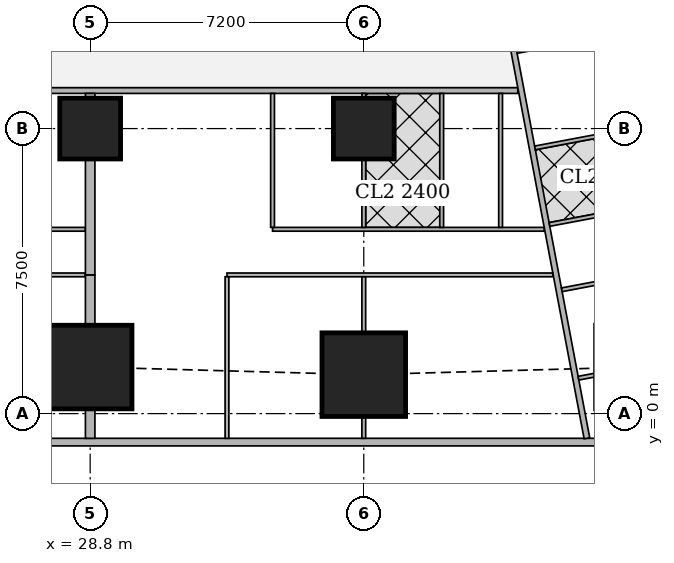
"""IFC4 building model, lengths in metres.
Left out: names, types, materials, properties, quantities, classifications, styles, units other than length and angle.
Written with IfcOpenShell. Run it as: python <this file> out.ifc"""

import sys

from ifc_helpers import new_model, si_unit, direction, frame, frame_2d, origin, origin_2d, place, context, subcontext, project, spatial, rectangle, extrude, element, fill, save


model = new_model("IFC4")
c1 = context("Model", 3, precision=1e-05, world=origin(), true_north=direction((0.0, 1.0)))
c2 = subcontext(c1, "Body", "Model", "MODEL_VIEW")
j1 = project(units=[si_unit("LENGTHUNIT", "METRE"), si_unit("PLANEANGLEUNIT", "RADIAN")], contexts=[c1])
p1 = place(None, origin())
s1 = spatial("IfcSite", under=j1, at=p1, CompositionType="ELEMENT")
p2 = place(p1, origin())
s2 = spatial("IfcBuilding", under=s1, at=p2, CompositionType="ELEMENT")
p3 = place(p2, frame((0.0, 0.0, 111.65)))
s3 = spatial("IfcBuildingStorey", under=s2, at=p3, CompositionType="ELEMENT", Elevation=111.65)
for number, where, z_axis, x_axis in (
    (1, (28.8, 1.225, 0.0), (0.0, 0.0, 1.0), (1.0, 0.0, 0.0)),
    (2, (36.0, 1.025, 0.0), (0.0, 0.0, 1.0), (1.0, 0.0, 0.0)),
):
    element("IfcColumn", number, at=place(p3, frame(where, z_axis=z_axis, x_axis=x_axis)), inside=s3, PredefinedType="COLUMN", context=c2, shape_type="SweptSolid", body=[
        extrude(rectangle(XDim=2.2, YDim=2.2, at=origin_2d()), origin(), (0.0, 0.0, 1.0), 3.75),
    ])
for number, where, z_axis, x_axis in (
    (3, (28.8, 7.5, 0.0), (0.0, 0.0, 1.0), (1.0, 0.0, 0.0)),
    (4, (36.0, 7.5, 0.0), (0.0, 0.0, 1.0), (1.0, 0.0, 0.0)),
):
    element("IfcColumn", number, at=place(p3, frame(where, z_axis=z_axis, x_axis=x_axis)), inside=s3, PredefinedType="COLUMN", context=c2, shape_type="SweptSolid", body=[
        extrude(rectangle(XDim=1.6, YDim=1.6, at=origin_2d()), origin(), (0.0, 0.0, 1.0), 3.75),
    ])
p4 = place(p3, frame((2.163, -0.75, 0.0), z_axis=(0.0, 0.0, 1.0), x_axis=(1.0, 0.0, 0.0)))
e5 = element("IfcWall", 5, at=p4, inside=s3, PredefinedType="SOLIDWALL", context=c2, shape_type="SweptSolid", body=[
    extrude(rectangle(XDim=45.628, YDim=0.2, at=frame_2d((22.814, 0.0))), origin(), (0.0, 0.0, 1.0), 3.5),
])
p5 = place(p4, frame((9.537, 0.0, 0.9)))
e6 = element("IfcOpeningElement", 6, at=p5, cuts=e5, PredefinedType="OPENING", context=c2, shape_type="SweptSolid", body=[
    extrude(rectangle(XDim=1.8, YDim=1.5, at=frame_2d((0.9, 0.75))), frame((0.0, 0.11, 0.0), z_axis=(0.0, -1.0, 0.0), x_axis=(1.0, 0.0, 0.0)), (0.0, 0.0, 1.0), 0.22),
])
p6 = place(p4, frame((13.137, 0.0, 0.9)))
e7 = element("IfcOpeningElement", 7, at=p6, cuts=e5, PredefinedType="OPENING", context=c2, shape_type="SweptSolid", body=[
    extrude(rectangle(XDim=1.8, YDim=1.5, at=frame_2d((0.9, 0.75))), frame((0.0, 0.11, 0.0), z_axis=(0.0, -1.0, 0.0), x_axis=(1.0, 0.0, 0.0)), (0.0, 0.0, 1.0), 0.22),
])
p7 = place(p4, frame((16.737, 0.0, 0.9)))
e8 = element("IfcOpeningElement", 8, at=p7, cuts=e5, PredefinedType="OPENING", context=c2, shape_type="SweptSolid", body=[
    extrude(rectangle(XDim=1.8, YDim=1.5, at=frame_2d((0.9, 0.75))), frame((0.0, 0.11, 0.0), z_axis=(0.0, -1.0, 0.0), x_axis=(1.0, 0.0, 0.0)), (0.0, 0.0, 1.0), 0.22),
])
p8 = place(p4, frame((20.337, 0.0, 0.9)))
e9 = element("IfcOpeningElement", 9, at=p8, cuts=e5, PredefinedType="OPENING", context=c2, shape_type="SweptSolid", body=[
    extrude(rectangle(XDim=1.8, YDim=1.5, at=frame_2d((0.9, 0.75))), frame((0.0, 0.11, 0.0), z_axis=(0.0, -1.0, 0.0), x_axis=(1.0, 0.0, 0.0)), (0.0, 0.0, 1.0), 0.22),
])
p9 = place(p4, frame((23.937, 0.0, 0.9)))
e10 = element("IfcOpeningElement", 10, at=p9, cuts=e5, PredefinedType="OPENING", context=c2, shape_type="SweptSolid", body=[
    extrude(rectangle(XDim=1.8, YDim=1.5, at=frame_2d((0.9, 0.75))), frame((0.0, 0.11, 0.0), z_axis=(0.0, -1.0, 0.0), x_axis=(1.0, 0.0, 0.0)), (0.0, 0.0, 1.0), 0.22),
])
p10 = place(p4, frame((27.537, 0.0, 0.9)))
e11 = element("IfcOpeningElement", 11, at=p10, cuts=e5, PredefinedType="OPENING", context=c2, shape_type="SweptSolid", body=[
    extrude(rectangle(XDim=1.8, YDim=1.5, at=frame_2d((0.9, 0.75))), frame((0.0, 0.11, 0.0), z_axis=(0.0, -1.0, 0.0), x_axis=(1.0, 0.0, 0.0)), (0.0, 0.0, 1.0), 0.22),
])
p11 = place(p4, frame((31.137, 0.0, 0.9)))
e12 = element("IfcOpeningElement", 12, at=p11, cuts=e5, PredefinedType="OPENING", context=c2, shape_type="SweptSolid", body=[
    extrude(rectangle(XDim=1.8, YDim=1.5, at=frame_2d((0.9, 0.75))), frame((0.0, 0.11, 0.0), z_axis=(0.0, -1.0, 0.0), x_axis=(1.0, 0.0, 0.0)), (0.0, 0.0, 1.0), 0.22),
])
p12 = place(p4, frame((34.737, 0.0, 0.9)))
e13 = element("IfcOpeningElement", 13, at=p12, cuts=e5, PredefinedType="OPENING", context=c2, shape_type="SweptSolid", body=[
    extrude(rectangle(XDim=1.8, YDim=1.5, at=frame_2d((0.9, 0.75))), frame((0.0, 0.11, 0.0), z_axis=(0.0, -1.0, 0.0), x_axis=(1.0, 0.0, 0.0)), (0.0, 0.0, 1.0), 0.22),
])
p13 = place(p3, frame((40.053, 8.5, 0.0), z_axis=(0.0, 0.0, 1.0), x_axis=(-1.0, 0.0, 0.0)))
e14 = element("IfcWall", 14, at=p13, inside=s3, PredefinedType="SOLIDWALL", context=c2, shape_type="SweptSolid", body=[
    extrude(rectangle(XDim=31.703, YDim=0.15, at=frame_2d((15.852, 0.0))), origin(), (0.0, 0.0, 1.0), 3.5),
])
p14 = place(p13, frame((28.103, 0.0, 0.0)))
e15 = element("IfcOpeningElement", 15, at=p14, cuts=e14, PredefinedType="OPENING", context=c2, shape_type="SweptSolid", body=[
    extrude(rectangle(XDim=1.0, YDim=2.1, at=frame_2d((0.5, 1.05))), frame((0.0, 0.085, 0.0), z_axis=(0.0, -1.0, 0.0), x_axis=(1.0, 0.0, 0.0)), (0.0, 0.0, 1.0), 0.17),
])
p15 = place(p13, frame((19.754, 0.0, 0.0)))
e16 = element("IfcOpeningElement", 16, at=p15, cuts=e14, PredefinedType="OPENING", context=c2, shape_type="SweptSolid", body=[
    extrude(rectangle(XDim=1.0, YDim=2.1, at=frame_2d((0.5, 1.05))), frame((0.0, 0.085, 0.0), z_axis=(0.0, -1.0, 0.0), x_axis=(1.0, 0.0, 0.0)), (0.0, 0.0, 1.0), 0.17),
])
p16 = place(p13, frame((8.353, 0.0, 0.0)))
e17 = element("IfcOpeningElement", 17, at=p16, cuts=e14, PredefinedType="OPENING", context=c2, shape_type="SweptSolid", body=[
    extrude(rectangle(XDim=1.0, YDim=2.1, at=frame_2d((0.5, 1.05))), frame((0.0, 0.085, 0.0), z_axis=(0.0, -1.0, 0.0), x_axis=(1.0, 0.0, 0.0)), (0.0, 0.0, 1.0), 0.17),
])
p17 = place(p3, frame((33.127, 45.65, 0.0), z_axis=(0.0, 0.0, 1.0), x_axis=(0.185598547723, -0.98262565562, 0.0)))
e18 = element("IfcWall", 18, at=p17, inside=s3, PredefinedType="SOLIDWALL", context=c2, shape_type="SweptSolid", body=[
    extrude(rectangle(XDim=47.118, YDim=0.15, at=frame_2d((23.559, 0.0))), origin(), (0.0, 0.0, 1.0), 2.2),
])
p18 = place(p17, frame((20.373, 0.0, 0.0)))
e19 = element("IfcOpeningElement", 19, at=p18, cuts=e18, PredefinedType="OPENING", context=c2, shape_type="SweptSolid", body=[
    extrude(rectangle(XDim=1.0, YDim=2.1, at=frame_2d((0.5, 1.05))), frame((0.0, 0.085, 0.0), z_axis=(0.0, -1.0, 0.0), x_axis=(1.0, 0.0, 0.0)), (0.0, 0.0, 1.0), 0.17),
])
p19 = place(p17, frame((24.188, 0.0, 0.0)))
e20 = element("IfcOpeningElement", 20, at=p19, cuts=e18, PredefinedType="OPENING", context=c2, shape_type="SweptSolid", body=[
    extrude(rectangle(XDim=1.0, YDim=2.1, at=frame_2d((0.5, 1.05))), frame((0.0, 0.085, 0.0), z_axis=(0.0, -1.0, 0.0), x_axis=(1.0, 0.0, 0.0)), (0.0, 0.0, 1.0), 0.17),
])
p20 = place(p17, frame((32.608, 0.0, 0.0)))
e21 = element("IfcOpeningElement", 21, at=p20, cuts=e18, PredefinedType="OPENING", context=c2, shape_type="SweptSolid", body=[
    extrude(rectangle(XDim=1.0, YDim=2.1, at=frame_2d((0.5, 1.05))), frame((0.0, 0.085, 0.0), z_axis=(0.0, -1.0, 0.0), x_axis=(1.0, 0.0, 0.0)), (0.0, 0.0, 1.0), 0.17),
])
p21 = place(p3, frame((28.675, 3.65, 0.0), z_axis=(0.0, 0.0, 1.0), x_axis=(-1.0, 0.0, 0.0)))
e22 = element("IfcWall", 22, at=p21, inside=s3, PredefinedType="PARTITIONING", context=c2, shape_type="SweptSolid", body=[
    extrude(rectangle(XDim=7.075, YDim=0.1, at=frame_2d((3.538, 0.0))), origin(), (0.0, 0.0, 1.0), 3.5),
])
p22 = place(p21, frame((5.975, 0.0, 0.0)))
e23 = element("IfcOpeningElement", 23, at=p22, cuts=e22, PredefinedType="OPENING", context=c2, shape_type="SweptSolid", body=[
    extrude(rectangle(XDim=0.9, YDim=2.1, at=frame_2d((0.45, 1.05))), frame((0.0, 0.06, 0.0), z_axis=(0.0, -1.0, 0.0), x_axis=(1.0, 0.0, 0.0)), (0.0, 0.0, 1.0), 0.12),
])
p23 = place(p21, frame((2.375, 0.0, 0.0)))
e24 = element("IfcOpeningElement", 24, at=p23, cuts=e22, PredefinedType="OPENING", context=c2, shape_type="SweptSolid", body=[
    extrude(rectangle(XDim=0.9, YDim=2.1, at=frame_2d((0.45, 1.05))), frame((0.0, 0.06, 0.0), z_axis=(0.0, -1.0, 0.0), x_axis=(1.0, 0.0, 0.0)), (0.0, 0.0, 1.0), 0.12),
])
p24 = place(p3, frame((28.675, 4.85, 0.0), z_axis=(0.0, 0.0, 1.0), x_axis=(-1.0, 0.0, 0.0)))
e25 = element("IfcWall", 25, at=p24, inside=s3, PredefinedType="PARTITIONING", context=c2, shape_type="SweptSolid", body=[
    extrude(rectangle(XDim=7.075, YDim=0.1, at=frame_2d((3.538, 0.0))), origin(), (0.0, 0.0, 1.0), 3.5),
])
p25 = place(p24, frame((5.6, 0.0, 0.0)))
e26 = element("IfcOpeningElement", 26, at=p25, cuts=e25, PredefinedType="OPENING", context=c2, shape_type="SweptSolid", body=[
    extrude(rectangle(XDim=0.9, YDim=2.1, at=frame_2d((0.45, 1.05))), frame((0.0, 0.06, 0.0), z_axis=(0.0, -1.0, 0.0), x_axis=(1.0, 0.0, 0.0)), (0.0, 0.0, 1.0), 0.12),
])
p26 = place(p24, frame((0.626, 0.0, 0.0)))
e27 = element("IfcOpeningElement", 27, at=p26, cuts=e25, PredefinedType="OPENING", context=c2, shape_type="SweptSolid", body=[
    extrude(rectangle(XDim=0.9, YDim=2.1, at=frame_2d((0.45, 1.05))), frame((0.0, 0.06, 0.0), z_axis=(0.0, -1.0, 0.0), x_axis=(1.0, 0.0, 0.0)), (0.0, 0.0, 1.0), 0.12),
])
p27 = place(p24, frame((3.201, 0.0, 0.0)))
e28 = element("IfcOpeningElement", 28, at=p27, cuts=e25, PredefinedType="OPENING", context=c2, shape_type="SweptSolid", body=[
    extrude(rectangle(XDim=0.9, YDim=2.1, at=frame_2d((0.45, 1.05))), frame((0.0, 0.06, 0.0), z_axis=(0.0, -1.0, 0.0), x_axis=(1.0, 0.0, 0.0)), (0.0, 0.0, 1.0), 0.12),
])
p28 = place(p3, frame((40.974, 3.65, 0.0), z_axis=(0.0, 0.0, 1.0), x_axis=(-1.0, 0.0, 0.0)))
e29 = element("IfcWall", 29, at=p28, inside=s3, PredefinedType="PARTITIONING", context=c2, shape_type="SweptSolid", body=[
    extrude(rectangle(XDim=8.574, YDim=0.1, at=frame_2d((4.287, 0.0))), origin(), (0.0, 0.0, 1.0), 3.5),
])
p29 = place(p28, frame((6.275, 0.0, 0.0)))
e30 = element("IfcOpeningElement", 30, at=p29, cuts=e29, PredefinedType="OPENING", context=c2, shape_type="SweptSolid", body=[
    extrude(rectangle(XDim=0.9, YDim=2.1, at=frame_2d((0.45, 1.05))), frame((0.0, 0.06, 0.0), z_axis=(0.0, -1.0, 0.0), x_axis=(1.0, 0.0, 0.0)), (0.0, 0.0, 1.0), 0.12),
])
p30 = place(p28, frame((3.874, 0.0, 0.0)))
e31 = element("IfcOpeningElement", 31, at=p30, cuts=e29, PredefinedType="OPENING", context=c2, shape_type="SweptSolid", body=[
    extrude(rectangle(XDim=0.9, YDim=2.1, at=frame_2d((0.45, 1.05))), frame((0.0, 0.06, 0.0), z_axis=(0.0, -1.0, 0.0), x_axis=(1.0, 0.0, 0.0)), (0.0, 0.0, 1.0), 0.12),
])
p31 = place(p3, frame((40.747, 4.85, 0.0), z_axis=(0.0, 0.0, 1.0), x_axis=(-1.0, 0.0, 0.0)))
e32 = element("IfcWall", 32, at=p31, inside=s3, PredefinedType="PARTITIONING", context=c2, shape_type="SweptSolid", body=[
    extrude(rectangle(XDim=7.148, YDim=0.1, at=frame_2d((3.574, 0.0))), origin(), (0.0, 0.0, 1.0), 3.5),
])
p32 = place(p31, frame((5.498, 0.0, 0.0)))
e33 = element("IfcOpeningElement", 33, at=p32, cuts=e32, PredefinedType="OPENING", context=c2, shape_type="SweptSolid", body=[
    extrude(rectangle(XDim=0.9, YDim=2.1, at=frame_2d((0.45, 1.05))), frame((0.0, 0.06, 0.0), z_axis=(0.0, -1.0, 0.0), x_axis=(1.0, 0.0, 0.0)), (0.0, 0.0, 1.0), 0.12),
])
p33 = place(p31, frame((3.272, 0.0, 0.0)))
e34 = element("IfcOpeningElement", 34, at=p33, cuts=e32, PredefinedType="OPENING", context=c2, shape_type="SweptSolid", body=[
    extrude(rectangle(XDim=0.9, YDim=2.1, at=frame_2d((0.45, 1.05))), frame((0.0, 0.06, 0.0), z_axis=(0.0, -1.0, 0.0), x_axis=(1.0, 0.0, 0.0)), (0.0, 0.0, 1.0), 0.12),
])
p34 = place(p31, frame((0.15, 0.0, 0.0)))
e35 = element("IfcOpeningElement", 35, at=p34, cuts=e32, PredefinedType="OPENING", context=c2, shape_type="SweptSolid", body=[
    extrude(rectangle(XDim=0.9, YDim=2.1, at=frame_2d((0.45, 1.05))), frame((0.0, 0.06, 0.0), z_axis=(0.0, -1.0, 0.0), x_axis=(1.0, 0.0, 0.0)), (0.0, 0.0, 1.0), 0.12),
])
p35 = place(p31, frame((1.472, 0.0, 0.0)))
e36 = element("IfcOpeningElement", 36, at=p35, cuts=e32, PredefinedType="OPENING", context=c2, shape_type="SweptSolid", body=[
    extrude(rectangle(XDim=0.9, YDim=2.1, at=frame_2d((0.45, 1.05))), frame((0.0, 0.06, 0.0), z_axis=(0.0, -1.0, 0.0), x_axis=(1.0, 0.0, 0.0)), (0.0, 0.0, 1.0), 0.12),
])
p36 = place(p3, frame((32.4, -0.65, 0.0), z_axis=(0.0, 0.0, 1.0), x_axis=(0.0, 1.0, 0.0)))
e37 = element("IfcWall", 37, at=p36, inside=s3, PredefinedType="PARTITIONING", context=c2, shape_type="SweptSolid", body=[
    extrude(rectangle(XDim=4.25, YDim=0.1, at=frame_2d((2.125, 0.0))), origin(), (0.0, 0.0, 1.0), 2.2),
])
p37 = place(p3, frame((36.0, -0.65, 0.0), z_axis=(0.0, 0.0, 1.0), x_axis=(0.0, 1.0, 0.0)))
e38 = element("IfcWall", 38, at=p37, inside=s3, PredefinedType="PARTITIONING", context=c2, shape_type="SweptSolid", body=[
    extrude(rectangle(XDim=0.574, YDim=0.1, at=frame_2d((0.287, 0.0))), origin(), (0.0, 0.0, 1.0), 3.5),
])
p38 = place(p3, frame((36.0, 2.126, 0.0), z_axis=(0.0, 0.0, 1.0), x_axis=(0.0, 1.0, 0.0)))
e39 = element("IfcWall", 39, at=p38, inside=s3, PredefinedType="PARTITIONING", context=c2, shape_type="SweptSolid", body=[
    extrude(rectangle(XDim=1.474, YDim=0.1, at=frame_2d((0.737, 0.0))), origin(), (0.0, 0.0, 1.0), 3.5),
])
p39 = place(p3, frame((33.599, 4.9, 0.0), z_axis=(0.0, 0.0, 1.0), x_axis=(0.0, 1.0, 0.0)))
e40 = element("IfcWall", 40, at=p39, inside=s3, PredefinedType="PARTITIONING", context=c2, shape_type="SweptSolid", body=[
    extrude(rectangle(XDim=3.525, YDim=0.1, at=frame_2d((1.763, 0.0))), origin(), (0.0, 0.0, 1.0), 3.5),
])
p40 = place(p3, frame((36.0, 4.9, 0.0), z_axis=(0.0, 0.0, 1.0), x_axis=(0.0, 1.0, 0.0)))
e41 = element("IfcWall", 41, at=p40, inside=s3, PredefinedType="PARTITIONING", context=c2, shape_type="SweptSolid", body=[
    extrude(rectangle(XDim=1.799, YDim=0.1, at=frame_2d((0.899, 0.0))), origin(), (0.0, 0.0, 1.0), 3.5),
])
p41 = place(p3, frame((36.0, 8.301, 0.0), z_axis=(0.0, 0.0, 1.0), x_axis=(0.0, 1.0, 0.0)))
e42 = element("IfcWall", 42, at=p41, inside=s3, PredefinedType="PARTITIONING", context=c2, shape_type="SweptSolid", body=[
    extrude(rectangle(XDim=0.124, YDim=0.1, at=frame_2d((0.062, 0.0))), origin(), (0.0, 0.0, 1.0), 3.5),
])
for number, where, z_axis, x_axis in (
    (43, (39.6, 4.9, 0.0), (0.0, 0.0, 1.0), (0.0, 1.0, 0.0)),
    (44, (38.05, 4.9, 0.0), (0.0, 0.0, 1.0), (0.0, 1.0, 0.0)),
):
    element("IfcWall", number, at=place(p3, frame(where, z_axis=z_axis, x_axis=x_axis)), inside=s3, PredefinedType="PARTITIONING", context=c2, shape_type="SweptSolid", body=[
        extrude(rectangle(XDim=3.525, YDim=0.1, at=frame_2d((1.763, 0.0))), origin(), (0.0, 0.0, 1.0), 3.5),
    ])
p42 = place(p3, frame((28.8, -0.65, 0.0), z_axis=(0.0, 0.0, 1.0), x_axis=(0.0, 1.0, 0.0)))
e45 = element("IfcWall", 45, at=p42, inside=s3, PredefinedType="SOLIDWALL", context=c2, shape_type="SweptSolid", body=[
    extrude(rectangle(XDim=0.774, YDim=0.25, at=frame_2d((0.387, 0.0))), origin(), (0.0, 0.0, 1.0), 3.5),
])
p43 = place(p3, frame((28.8, 2.326, 0.0), z_axis=(0.0, 0.0, 1.0), x_axis=(0.0, 1.0, 0.0)))
e46 = element("IfcWall", 46, at=p43, inside=s3, PredefinedType="SOLIDWALL", context=c2, shape_type="SweptSolid", body=[
    extrude(rectangle(XDim=1.324, YDim=0.25, at=frame_2d((0.662, 0.0))), origin(), (0.0, 0.0, 1.0), 3.5),
])
p44 = place(p3, frame((28.8, 3.65, 0.0), z_axis=(0.0, 0.0, 1.0), x_axis=(0.0, 1.0, 0.0)))
e47 = element("IfcWall", 47, at=p44, inside=s3, PredefinedType="SOLIDWALL", context=c2, shape_type="SweptSolid", body=[
    extrude(rectangle(XDim=3.049, YDim=0.25, at=frame_2d((1.524, 0.0))), origin(), (0.0, 0.0, 1.0), 3.5),
])
p45 = place(p3, frame((28.8, 8.301, 0.0), z_axis=(0.0, 0.0, 1.0), x_axis=(0.0, 1.0, 0.0)))
e48 = element("IfcWall", 48, at=p45, inside=s3, PredefinedType="SOLIDWALL", context=c2, shape_type="SweptSolid", body=[
    extrude(rectangle(XDim=0.124, YDim=0.25, at=frame_2d((0.062, 0.0))), origin(), (0.0, 0.0, 1.0), 3.5),
])
p46 = place(p3, frame((43.49, 10.183, 0.0), z_axis=(0.0, 0.0, 1.0), x_axis=(-0.982588017646, -0.185797706064, 0.0)))
e49 = element("IfcWall", 49, at=p46, inside=s3, PredefinedType="PARTITIONING", context=c2, shape_type="SweptSolid", body=[
    extrude(rectangle(XDim=3.525, YDim=0.1, at=frame_2d((1.763, 0.0))), origin(), (0.0, 0.0, 1.0), 3.5),
])
p47 = place(p46, frame((1.325, 0.0, 0.0)))
e50 = element("IfcOpeningElement", 50, at=p47, cuts=e49, PredefinedType="OPENING", context=c2, shape_type="SweptSolid", body=[
    extrude(rectangle(XDim=0.9, YDim=2.1, at=frame_2d((0.45, 1.05))), frame((0.0, 0.06, 0.0), z_axis=(0.0, -1.0, 0.0), x_axis=(1.0, 0.0, 0.0)), (0.0, 0.0, 1.0), 0.12),
])
p48 = place(p3, frame((42.39, 7.347, 0.0), z_axis=(0.0, 0.0, 1.0), x_axis=(-0.982633642782, -0.185556255819, 0.0)))
e51 = element("IfcWall", 51, at=p48, inside=s3, PredefinedType="PARTITIONING", context=c2, shape_type="SweptSolid", body=[
    extrude(rectangle(XDim=1.918, YDim=0.1, at=frame_2d((0.959, 0.0))), origin(), (0.0, 0.0, 1.0), 3.5),
])
p49 = place(p3, frame((42.09, 1.015, 0.0), z_axis=(0.0, 0.0, 1.0), x_axis=(-0.982680384557, -0.185308558375, 0.0)))
e52 = element("IfcWall", 52, at=p49, inside=s3, PredefinedType="PARTITIONING", context=c2, shape_type="SweptSolid", body=[
    extrude(rectangle(XDim=0.448, YDim=0.1, at=frame_2d((0.224, 0.0))), origin(), (0.0, 0.0, 1.0), 2.05),
])
p50 = place(p3, frame((44.35, 5.631, 0.0), z_axis=(0.0, 0.0, 1.0), x_axis=(-0.982638553676, -0.185530247748, 0.0)))
e53 = element("IfcWall", 53, at=p50, inside=s3, PredefinedType="PARTITIONING", context=c2, shape_type="SweptSolid", body=[
    extrude(rectangle(XDim=3.525, YDim=0.1, at=frame_2d((1.763, 0.0))), origin(), (0.0, 0.0, 1.0), 3.5),
])
p51 = place(p3, frame((41.21, 3.258, 0.0), z_axis=(0.0, 0.0, 1.0), x_axis=(0.982638553676, 0.185530247748, 0.0)))
e54 = element("IfcWall", 54, at=p51, inside=s3, PredefinedType="PARTITIONING", context=c2, shape_type="SweptSolid", body=[
    extrude(rectangle(XDim=3.525, YDim=0.1, at=frame_2d((1.763, 0.0))), origin(), (0.0, 0.0, 1.0), 3.5),
])
p52 = place(p51, frame((1.65, 0.0, 0.0)))
e55 = element("IfcOpeningElement", 55, at=p52, cuts=e54, PredefinedType="OPENING", context=c2, shape_type="SweptSolid", body=[
    extrude(rectangle(XDim=0.9, YDim=2.1, at=frame_2d((0.45, 1.05))), frame((0.0, 0.06, 0.0), z_axis=(0.0, -1.0, 0.0), x_axis=(1.0, 0.0, 0.0)), (0.0, 0.0, 1.0), 0.12),
])
p53 = place(p9, origin())
e56 = element("IfcWindow", 56, at=p53, inside=s3, PartitioningType="SINGLE_PANEL", PredefinedType="WINDOW", context=c2, shape_type="SweptSolid", body=[
    extrude(rectangle(XDim=1.8, YDim=1.5, at=frame_2d((0.9, 0.75))), frame((0.0, 0.03, 0.0), z_axis=(0.0, -1.0, 0.0), x_axis=(1.0, 0.0, 0.0)), (0.0, 0.0, 1.0), 0.06),
])
fill(e10, e56)
p54 = place(p10, origin())
e57 = element("IfcWindow", 57, at=p54, inside=s3, PartitioningType="SINGLE_PANEL", PredefinedType="WINDOW", context=c2, shape_type="SweptSolid", body=[
    extrude(rectangle(XDim=1.8, YDim=1.5, at=frame_2d((0.9, 0.75))), frame((0.0, 0.03, 0.0), z_axis=(0.0, -1.0, 0.0), x_axis=(1.0, 0.0, 0.0)), (0.0, 0.0, 1.0), 0.06),
])
fill(e11, e57)
p55 = place(p11, origin())
e58 = element("IfcWindow", 58, at=p55, inside=s3, PartitioningType="SINGLE_PANEL", PredefinedType="WINDOW", context=c2, shape_type="SweptSolid", body=[
    extrude(rectangle(XDim=1.8, YDim=1.5, at=frame_2d((0.9, 0.75))), frame((0.0, 0.03, 0.0), z_axis=(0.0, -1.0, 0.0), x_axis=(1.0, 0.0, 0.0)), (0.0, 0.0, 1.0), 0.06),
])
fill(e12, e58)
p56 = place(p12, origin())
e59 = element("IfcWindow", 59, at=p56, inside=s3, PartitioningType="SINGLE_PANEL", PredefinedType="WINDOW", context=c2, shape_type="SweptSolid", body=[
    extrude(rectangle(XDim=1.8, YDim=1.5, at=frame_2d((0.9, 0.75))), frame((0.0, 0.03, 0.0), z_axis=(0.0, -1.0, 0.0), x_axis=(1.0, 0.0, 0.0)), (0.0, 0.0, 1.0), 0.06),
])
fill(e13, e59)
p57 = place(p26, origin())
e60 = element("IfcDoor", 60, at=p57, inside=s3, OperationType="SINGLE_SWING_RIGHT", PredefinedType="DOOR", context=c2, shape_type="SweptSolid", body=[
    extrude(rectangle(XDim=0.9, YDim=2.1, at=frame_2d((0.45, 1.05))), frame((0.0, 0.025, 0.0), z_axis=(0.0, -1.0, 0.0), x_axis=(1.0, 0.0, 0.0)), (0.0, 0.0, 1.0), 0.05),
])
fill(e27, e60)
p58 = place(p29, origin())
e61 = element("IfcDoor", 61, at=p58, inside=s3, OperationType="SINGLE_SWING_RIGHT", PredefinedType="DOOR", context=c2, shape_type="SweptSolid", body=[
    extrude(rectangle(XDim=0.9, YDim=2.1, at=frame_2d((0.45, 1.05))), frame((0.0, 0.025, 0.0), z_axis=(0.0, -1.0, 0.0), x_axis=(1.0, 0.0, 0.0)), (0.0, 0.0, 1.0), 0.05),
])
fill(e30, e61)
p59 = place(p30, origin())
e62 = element("IfcDoor", 62, at=p59, inside=s3, OperationType="SINGLE_SWING_RIGHT", PredefinedType="DOOR", context=c2, shape_type="SweptSolid", body=[
    extrude(rectangle(XDim=0.9, YDim=2.1, at=frame_2d((0.45, 1.05))), frame((0.0, 0.025, 0.0), z_axis=(0.0, -1.0, 0.0), x_axis=(1.0, 0.0, 0.0)), (0.0, 0.0, 1.0), 0.05),
])
fill(e31, e62)
p60 = place(p32, origin())
e63 = element("IfcDoor", 63, at=p60, inside=s3, OperationType="SINGLE_SWING_LEFT", PredefinedType="DOOR", context=c2, shape_type="SweptSolid", body=[
    extrude(rectangle(XDim=0.9, YDim=2.1, at=frame_2d((0.45, 1.05))), frame((0.0, 0.025, 0.0), z_axis=(0.0, -1.0, 0.0), x_axis=(1.0, 0.0, 0.0)), (0.0, 0.0, 1.0), 0.05),
])
fill(e33, e63)
p61 = place(p33, origin())
e64 = element("IfcDoor", 64, at=p61, inside=s3, OperationType="SINGLE_SWING_RIGHT", PredefinedType="DOOR", context=c2, shape_type="SweptSolid", body=[
    extrude(rectangle(XDim=0.9, YDim=2.1, at=frame_2d((0.45, 1.05))), frame((0.0, 0.025, 0.0), z_axis=(0.0, -1.0, 0.0), x_axis=(1.0, 0.0, 0.0)), (0.0, 0.0, 1.0), 0.05),
])
fill(e34, e64)
p62 = place(p34, origin())
e65 = element("IfcDoor", 65, at=p62, inside=s3, OperationType="SINGLE_SWING_RIGHT", PredefinedType="DOOR", context=c2, shape_type="SweptSolid", body=[
    extrude(rectangle(XDim=0.9, YDim=2.1, at=frame_2d((0.45, 1.05))), frame((0.0, 0.025, 0.0), z_axis=(0.0, -1.0, 0.0), x_axis=(1.0, 0.0, 0.0)), (0.0, 0.0, 1.0), 0.05),
])
fill(e35, e65)
p63 = place(p35, origin())
e66 = element("IfcDoor", 66, at=p63, inside=s3, OperationType="SINGLE_SWING_LEFT", PredefinedType="DOOR", context=c2, shape_type="SweptSolid", body=[
    extrude(rectangle(XDim=0.9, YDim=2.1, at=frame_2d((0.45, 1.05))), frame((0.0, 0.025, 0.0), z_axis=(0.0, -1.0, 0.0), x_axis=(1.0, 0.0, 0.0)), (0.0, 0.0, 1.0), 0.05),
])
fill(e36, e66)
p64 = place(p16, origin())
e67 = element("IfcDoor", 67, at=p64, inside=s3, OperationType="SINGLE_SWING_RIGHT", PredefinedType="DOOR", context=c2, shape_type="SweptSolid", body=[
    extrude(rectangle(XDim=1.0, YDim=2.1, at=frame_2d((0.5, 1.05))), frame((0.0, 0.025, 0.0), z_axis=(0.0, -1.0, 0.0), x_axis=(1.0, 0.0, 0.0)), (0.0, 0.0, 1.0), 0.05),
])
fill(e17, e67)
save(model, sys.argv[1])
